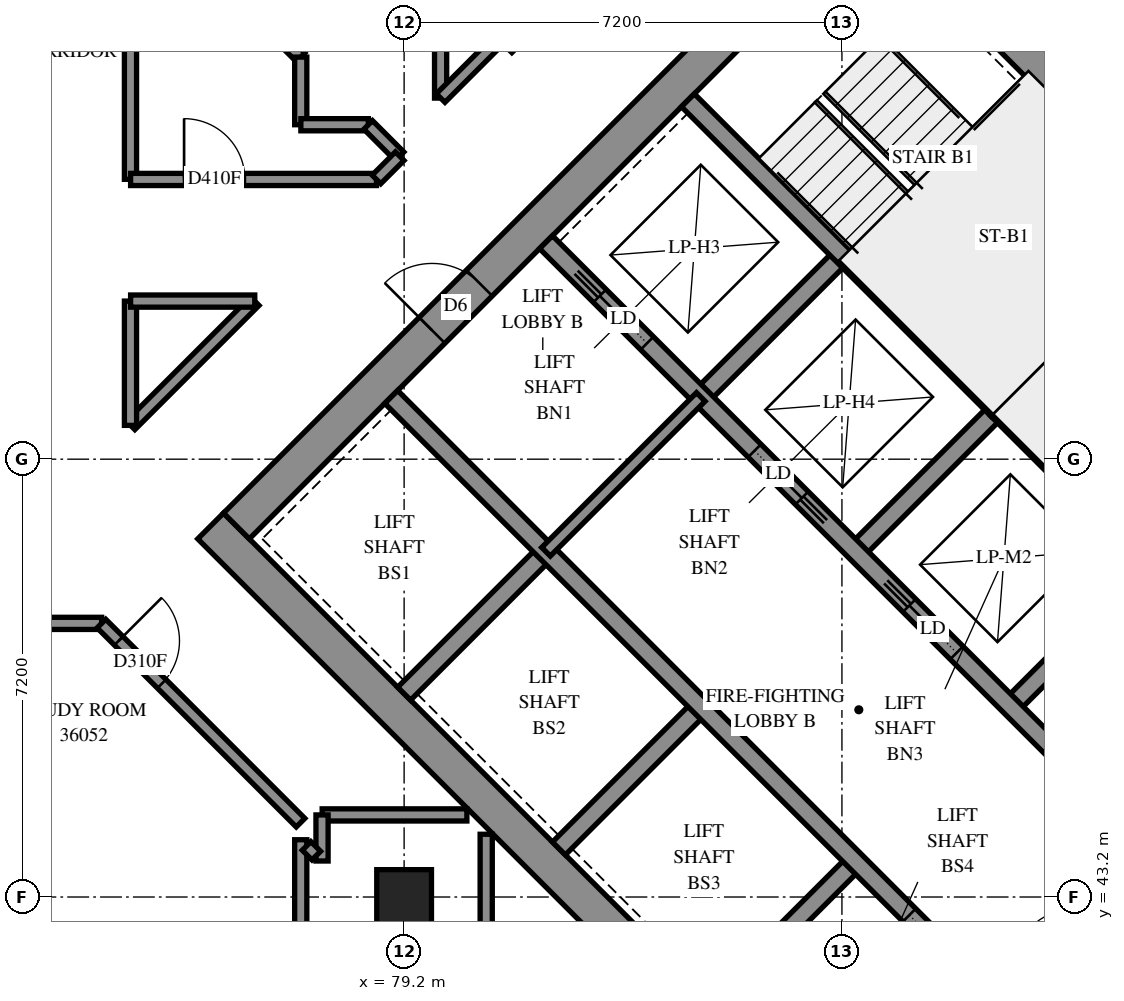
"""IFC4 building model, lengths in metres.
Left out: names, types, materials, properties, quantities, classifications, styles, units other than length and angle.
Written with IfcOpenShell. Run it as: python <this file> out.ifc"""

import sys

from ifc_helpers import new_model, si_unit, direction, frame, frame_2d, origin, origin_2d, place, context, subcontext, project, spatial, rectangle, extrude, element, fill, save


model = new_model("IFC4")
c1 = context("Model", 3, precision=1e-05, world=origin(), true_north=direction((0.0, 1.0)))
c2 = subcontext(c1, "Body", "Model", "MODEL_VIEW")
j1 = project(units=[si_unit("LENGTHUNIT", "METRE"), si_unit("PLANEANGLEUNIT", "RADIAN")], contexts=[c1])
p1 = place(None, origin())
s1 = spatial("IfcSite", under=j1, at=p1, CompositionType="ELEMENT")
p2 = place(p1, origin())
s2 = spatial("IfcBuilding", under=s1, at=p2, CompositionType="ELEMENT")
p3 = place(p2, frame((0.0, 0.0, 135.4)))
s3 = spatial("IfcBuildingStorey", under=s2, at=p3, CompositionType="ELEMENT", Elevation=135.4)
p4 = place(p3, frame((79.2, 43.2, 0.0), z_axis=(0.0, 0.0, 1.0), x_axis=(1.0, 0.0, 0.0)))
e1 = element("IfcColumn", 1, at=p4, inside=s3, PredefinedType="COLUMN", context=c2, shape_type="SweptSolid", body=[
    extrude(rectangle(XDim=0.9, YDim=0.9, at=origin_2d()), origin(), (0.0, 0.0, 1.0), 3.1),
])
p5 = place(p3, frame((76.018, 49.302, -0.3), z_axis=(0.0, 0.0, 1.0), x_axis=(0.7071067812, -0.7071067812, 0.0)))
e2 = element("IfcWall", 2, at=p5, inside=s3, PredefinedType="SHEAR", context=c2, shape_type="SweptSolid", body=[
    extrude(rectangle(XDim=15.6, YDim=0.6, at=frame_2d((7.8, 0.0))), origin(), (0.0, 0.0, 1.0), 2.7),
])
p6 = place(p3, frame((86.625, 59.908, -0.3), z_axis=(0.0, 0.0, 1.0), x_axis=(0.7071067812, -0.7071067812, 0.0)))
e3 = element("IfcWall", 3, at=p6, inside=s3, PredefinedType="SHEAR", context=c2, shape_type="SweptSolid", body=[
    extrude(rectangle(XDim=15.6, YDim=0.6, at=frame_2d((7.8, 0.0))), origin(), (0.0, 0.0, 1.0), 2.7),
])
p7 = place(p6, frame((10.6, 0.0, 0.3)))
e4 = element("IfcOpeningElement", 4, at=p7, cuts=e3, PredefinedType="OPENING", context=c2, shape_type="SweptSolid", body=[
    extrude(rectangle(XDim=0.8, YDim=2.1, at=frame_2d((0.4, 1.05))), frame((0.0, 0.31, 0.0), z_axis=(0.0, -1.0, 0.0), x_axis=(1.0, 0.0, 0.0)), (0.0, 0.0, 1.0), 0.62),
])
p8 = place(p3, frame((76.442, 49.302, -0.3), z_axis=(0.0, 0.0, 1.0), x_axis=(0.7071067812, 0.7071067812, 0.0)))
e5 = element("IfcWall", 5, at=p8, inside=s3, PredefinedType="SHEAR", context=c2, shape_type="SweptSolid", body=[
    extrude(rectangle(XDim=14.4, YDim=0.6, at=frame_2d((7.2, 0.0))), origin(), (0.0, 0.0, 1.0), 2.7),
])
p9 = place(p8, frame((4.55, 0.0, 0.3)))
e6 = element("IfcOpeningElement", 6, at=p9, cuts=e5, PredefinedType="OPENING", context=c2, shape_type="SweptSolid", body=[
    extrude(rectangle(XDim=1.1, YDim=2.1, at=frame_2d((0.55, 1.05))), frame((0.0, 0.31, 0.0), z_axis=(0.0, -1.0, 0.0), x_axis=(1.0, 0.0, 0.0)), (0.0, 0.0, 1.0), 0.62),
])
p10 = place(p8, frame((11.35, 0.0, 0.3)))
e7 = element("IfcOpeningElement", 7, at=p10, cuts=e5, PredefinedType="OPENING", context=c2, shape_type="SweptSolid", body=[
    extrude(rectangle(XDim=1.1, YDim=2.1, at=frame_2d((0.55, 1.05))), frame((0.0, 0.31, 0.0), z_axis=(0.0, -1.0, 0.0), x_axis=(1.0, 0.0, 0.0)), (0.0, 0.0, 1.0), 0.62),
])
p11 = place(p3, frame((87.049, 38.695, -0.3), z_axis=(0.0, 0.0, 1.0), x_axis=(0.7071067812, 0.7071067812, 0.0)))
e8 = element("IfcWall", 8, at=p11, inside=s3, PredefinedType="SHEAR", context=c2, shape_type="SweptSolid", body=[
    extrude(rectangle(XDim=14.4, YDim=0.6, at=frame_2d((7.2, 0.0))), origin(), (0.0, 0.0, 1.0), 2.7),
])
p12 = place(p11, frame((4.55, 0.0, 0.3)))
e9 = element("IfcOpeningElement", 9, at=p12, cuts=e8, PredefinedType="OPENING", context=c2, shape_type="SweptSolid", body=[
    extrude(rectangle(XDim=1.1, YDim=2.1, at=frame_2d((0.55, 1.05))), frame((0.0, 0.31, 0.0), z_axis=(0.0, -1.0, 0.0), x_axis=(1.0, 0.0, 0.0)), (0.0, 0.0, 1.0), 0.62),
])
p13 = place(p11, frame((11.35, 0.0, 0.3)))
e10 = element("IfcOpeningElement", 10, at=p13, cuts=e8, PredefinedType="OPENING", context=c2, shape_type="SweptSolid", body=[
    extrude(rectangle(XDim=1.1, YDim=2.1, at=frame_2d((0.55, 1.05))), frame((0.0, 0.31, 0.0), z_axis=(0.0, -1.0, 0.0), x_axis=(1.0, 0.0, 0.0)), (0.0, 0.0, 1.0), 0.62),
])
for number, where, z_axis, x_axis in (
    (11, (79.2, 46.544, 0.0), (0.0, 0.0, 1.0), (0.707, 0.707, 0.0)),
    (12, (84.079, 51.423, 0.0), (0.0, 0.0, 1.0), (0.707, 0.707, 0.0)),
):
    element("IfcWall", number, at=place(p3, frame(where, z_axis=z_axis, x_axis=x_axis)), inside=s3, PredefinedType="SOLIDWALL", context=c2, shape_type="SweptSolid", body=[
        extrude(rectangle(XDim=3.3, YDim=0.3, at=frame_2d((1.65, 0.0))), origin(), (0.0, 0.0, 1.0), 3.1),
    ])
p14 = place(p3, frame((81.746, 43.999, 0.0), z_axis=(0.0, 0.0, 1.0), x_axis=(0.7071067812, 0.7071067812, 0.0)))
e13 = element("IfcWall", 13, at=p14, inside=s3, PredefinedType="SOLIDWALL", context=c2, shape_type="SweptSolid", body=[
    extrude(rectangle(XDim=3.3, YDim=0.3, at=frame_2d((1.65, 0.0))), origin(), (0.0, 0.0, 1.0), 3.1),
])
p15 = place(p3, frame((86.625, 48.878, 0.0), z_axis=(0.0, 0.0, 1.0), x_axis=(0.7071067812, 0.7071067812, 0.0)))
e14 = element("IfcWall", 14, at=p15, inside=s3, PredefinedType="SOLIDWALL", context=c2, shape_type="SweptSolid", body=[
    extrude(rectangle(XDim=3.3, YDim=0.3, at=frame_2d((1.65, 0.0))), origin(), (0.0, 0.0, 1.0), 3.1),
])
p16 = place(p3, frame((84.291, 41.453, 0.0), z_axis=(0.0, 0.0, 1.0), x_axis=(0.7071067812, 0.7071067812, 0.0)))
e15 = element("IfcWall", 15, at=p16, inside=s3, PredefinedType="SOLIDWALL", context=c2, shape_type="SweptSolid", body=[
    extrude(rectangle(XDim=3.3, YDim=0.3, at=frame_2d((1.65, 0.0))), origin(), (0.0, 0.0, 1.0), 3.1),
])
p17 = place(p3, frame((89.17, 46.332, 0.0), z_axis=(0.0, 0.0, 1.0), x_axis=(0.7071067812, 0.7071067812, 0.0)))
e16 = element("IfcWall", 16, at=p17, inside=s3, PredefinedType="SOLIDWALL", context=c2, shape_type="SweptSolid", body=[
    extrude(rectangle(XDim=3.3, YDim=0.3, at=frame_2d((1.65, 0.0))), origin(), (0.0, 0.0, 1.0), 3.1),
])
p18 = place(p3, frame((78.988, 51.423, 0.0), z_axis=(0.0, 0.0, 1.0), x_axis=(0.7071067812, -0.7071067812, 0.0)))
e17 = element("IfcWall", 17, at=p18, inside=s3, PredefinedType="SOLIDWALL", context=c2, shape_type="SweptSolid", body=[
    extrude(rectangle(XDim=14.4, YDim=0.3, at=frame_2d((7.2, 0.0))), origin(), (0.0, 0.0, 1.0), 3.1),
])
p19 = place(p18, frame((12.05, 0.0, 0.0)))
e18 = element("IfcOpeningElement", 18, at=p19, cuts=e17, PredefinedType="OPENING", context=c2, shape_type="SweptSolid", body=[
    extrude(rectangle(XDim=1.1, YDim=2.1, at=frame_2d((0.55, 1.05))), frame((0.0, 0.16, 0.0), z_axis=(0.0, -1.0, 0.0), x_axis=(1.0, 0.0, 0.0)), (0.0, 0.0, 1.0), 0.32),
])
p20 = place(p3, frame((81.534, 53.969, 0.0), z_axis=(0.0, 0.0, 1.0), x_axis=(0.707103309, -0.7071102534, 0.0)))
e19 = element("IfcWall", 19, at=p20, inside=s3, PredefinedType="SOLIDWALL", context=c2, shape_type="SweptSolid", body=[
    extrude(rectangle(XDim=14.4, YDim=0.3, at=frame_2d((7.2, 0.0))), origin(), (0.0, 0.0, 1.0), 3.1),
])
p21 = place(p20, frame((1.25, 0.0, 0.0)))
e20 = element("IfcOpeningElement", 20, at=p21, cuts=e19, PredefinedType="OPENING", context=c2, shape_type="SweptSolid", body=[
    extrude(rectangle(XDim=1.1, YDim=2.1, at=frame_2d((0.55, 1.05))), frame((0.0, 0.16, 0.0), z_axis=(0.0, -1.0, 0.0), x_axis=(1.0, 0.0, 0.0)), (0.0, 0.0, 1.0), 0.32),
])
p22 = place(p20, frame((4.85, 0.0, 0.0)))
e21 = element("IfcOpeningElement", 21, at=p22, cuts=e19, PredefinedType="OPENING", context=c2, shape_type="SweptSolid", body=[
    extrude(rectangle(XDim=1.1, YDim=2.1, at=frame_2d((0.55, 1.05))), frame((0.0, 0.16, 0.0), z_axis=(0.0, -1.0, 0.0), x_axis=(1.0, 0.0, 0.0)), (0.0, 0.0, 1.0), 0.32),
])
p23 = place(p20, frame((8.45, 0.0, 0.0)))
e22 = element("IfcOpeningElement", 22, at=p23, cuts=e19, PredefinedType="OPENING", context=c2, shape_type="SweptSolid", body=[
    extrude(rectangle(XDim=1.1, YDim=2.1, at=frame_2d((0.55, 1.05))), frame((0.0, 0.16, 0.0), z_axis=(0.0, -1.0, 0.0), x_axis=(1.0, 0.0, 0.0)), (0.0, 0.0, 1.0), 0.32),
])
p24 = place(p20, frame((12.05, 0.0, 0.0)))
e23 = element("IfcOpeningElement", 23, at=p24, cuts=e19, PredefinedType="OPENING", context=c2, shape_type="SweptSolid", body=[
    extrude(rectangle(XDim=1.1, YDim=2.1, at=frame_2d((0.55, 1.05))), frame((0.0, 0.16, 0.0), z_axis=(0.0, -1.0, 0.0), x_axis=(1.0, 0.0, 0.0)), (0.0, 0.0, 1.0), 0.32),
])
for number, where, z_axis, x_axis in (
    (24, (83.867, 56.302, 0.0), (0.0, 0.0, 1.0), (0.707, -0.707, 0.0)),
    (25, (88.958, 51.211, 0.0), (0.0, 0.0, 1.0), (0.707, -0.707, 0.0)),
):
    element("IfcWall", number, at=place(p3, frame(where, z_axis=z_axis, x_axis=x_axis)), inside=s3, PredefinedType="SOLIDWALL", context=c2, shape_type="SweptSolid", body=[
        extrude(rectangle(XDim=7.2, YDim=0.3, at=frame_2d((3.6, 0.0))), origin(), (0.0, 0.0, 1.0), 3.1),
    ])
p25 = place(p3, frame((88.958, 51.211, 0.0), z_axis=(0.0, 0.0, 1.0), x_axis=(0.7071067812, 0.7071067812, 0.0)))
e26 = element("IfcWall", 26, at=p25, inside=s3, PredefinedType="SOLIDWALL", context=c2, shape_type="SweptSolid", body=[
    extrude(rectangle(XDim=4.2, YDim=0.3, at=frame_2d((2.1, 0.0))), origin(), (0.0, 0.0, 1.0), 3.1),
])
p26 = place(p3, frame((81.534, 48.878, 0.0), z_axis=(0.0, 0.0, 1.0), x_axis=(0.707092892, 0.7071206701, 0.0)))
e27 = element("IfcWall", 27, at=p26, inside=s3, PredefinedType="PARTITIONING", context=c2, shape_type="SweptSolid", body=[
    extrude(rectangle(XDim=3.6, YDim=0.2, at=frame_2d((1.8, 0.0))), origin(), (0.0, 0.0, 1.0), 3.1),
])
p27 = place(p3, frame((54.9, 47.7, 0.0), z_axis=(0.0, 0.0, 1.0), x_axis=(1.0, 0.0, 0.0)))
e28 = element("IfcWall", 28, at=p27, inside=s3, PredefinedType="PARTITIONING", context=c2, shape_type="SweptSolid", body=[
    extrude(rectangle(XDim=19.326, YDim=0.2, at=frame_2d((9.663, 0.0))), origin(), (0.0, 0.0, 1.0), 3.1),
])
p28 = place(p27, frame((5.0, 0.0, 0.0)))
e29 = element("IfcOpeningElement", 29, at=p28, cuts=e28, PredefinedType="OPENING", context=c2, shape_type="SweptSolid", body=[
    extrude(rectangle(XDim=0.9, YDim=2.1, at=frame_2d((0.45, 1.05))), frame((0.0, 0.11, 0.0), z_axis=(0.0, -1.0, 0.0), x_axis=(1.0, 0.0, 0.0)), (0.0, 0.0, 1.0), 0.22),
])
p29 = place(p27, frame((12.2, 0.0, 0.0)))
e30 = element("IfcOpeningElement", 30, at=p29, cuts=e28, PredefinedType="OPENING", context=c2, shape_type="SweptSolid", body=[
    extrude(rectangle(XDim=0.9, YDim=2.1, at=frame_2d((0.45, 1.05))), frame((0.0, 0.11, 0.0), z_axis=(0.0, -1.0, 0.0), x_axis=(1.0, 0.0, 0.0)), (0.0, 0.0, 1.0), 0.22),
])
p30 = place(p27, frame((6.7, 0.0, 0.0)))
e31 = element("IfcOpeningElement", 31, at=p30, cuts=e28, PredefinedType="OPENING", context=c2, shape_type="SweptSolid", body=[
    extrude(rectangle(XDim=0.9, YDim=2.1, at=frame_2d((0.45, 1.05))), frame((0.0, 0.11, 0.0), z_axis=(0.0, -1.0, 0.0), x_axis=(1.0, 0.0, 0.0)), (0.0, 0.0, 1.0), 0.22),
])
p31 = place(p27, frame((13.9, 0.0, 0.0)))
e32 = element("IfcOpeningElement", 32, at=p31, cuts=e28, PredefinedType="OPENING", context=c2, shape_type="SweptSolid", body=[
    extrude(rectangle(XDim=0.9, YDim=2.1, at=frame_2d((0.45, 1.05))), frame((0.0, 0.11, 0.0), z_axis=(0.0, -1.0, 0.0), x_axis=(1.0, 0.0, 0.0)), (0.0, 0.0, 1.0), 0.22),
])
p32 = place(p3, frame((88.326, 61.609, 0.0), z_axis=(0.0, 0.0, 1.0), x_axis=(0.7071067812, -0.7071067812, 0.0)))
e33 = element("IfcWall", 33, at=p32, inside=s3, PredefinedType="PARTITIONING", context=c2, shape_type="SweptSolid", body=[
    extrude(rectangle(XDim=10.14, YDim=0.2, at=frame_2d((5.07, 0.0))), origin(), (0.0, 0.0, 1.0), 3.1),
])
p33 = place(p32, frame((8.422, 0.0, 0.0)))
e34 = element("IfcOpeningElement", 34, at=p33, cuts=e33, PredefinedType="OPENING", context=c2, shape_type="SweptSolid", body=[
    extrude(rectangle(XDim=0.9, YDim=2.1, at=frame_2d((0.45, 1.05))), frame((0.0, 0.11, 0.0), z_axis=(0.0, -1.0, 0.0), x_axis=(1.0, 0.0, 0.0)), (0.0, 0.0, 1.0), 0.22),
])
p34 = place(p3, frame((80.901, 57.157, 0.0), z_axis=(0.0, 0.0, 1.0), x_axis=(0.7071067812, 0.7071067812, 0.0)))
e35 = element("IfcWall", 35, at=p34, inside=s3, PredefinedType="PARTITIONING", context=c2, shape_type="SweptSolid", body=[
    extrude(rectangle(XDim=8.392, YDim=0.2, at=frame_2d((4.196, 0.0))), origin(), (0.0, 0.0, 1.0), 3.1),
])
p35 = place(p3, frame((74.7, 55.002, 0.0), z_axis=(0.0, 0.0, 1.0), x_axis=(0.0, 1.0, 0.0)))
e36 = element("IfcWall", 36, at=p35, inside=s3, PredefinedType="PARTITIONING", context=c2, shape_type="SweptSolid", body=[
    extrude(rectangle(XDim=4.808, YDim=0.2, at=frame_2d((2.404, 0.0))), origin(), (0.0, 0.0, 1.0), 3.1),
])
p36 = place(p3, frame((74.223, 47.697, 0.0), z_axis=(0.0, 0.0, 1.0), x_axis=(0.7071067812, -0.7071067812, 0.0)))
e37 = element("IfcWall", 37, at=p36, inside=s3, PredefinedType="PARTITIONING", context=c2, shape_type="SweptSolid", body=[
    extrude(rectangle(XDim=4.63, YDim=0.2, at=frame_2d((2.315, 0.0))), origin(), (0.0, 0.0, 1.0), 3.1),
])
p37 = place(p36, frame((0.401, 0.0, 0.0)))
e38 = element("IfcOpeningElement", 38, at=p37, cuts=e37, PredefinedType="OPENING", context=c2, shape_type="SweptSolid", body=[
    extrude(rectangle(XDim=1.0, YDim=2.1, at=frame_2d((0.5, 1.05))), frame((0.0, 0.11, 0.0), z_axis=(0.0, -1.0, 0.0), x_axis=(1.0, 0.0, 0.0)), (0.0, 0.0, 1.0), 0.22),
])
p38 = place(p3, frame((74.702, 55.0, 0.0), z_axis=(0.0, 0.0, 1.0), x_axis=(1.0, 0.0, 0.0)))
e39 = element("IfcWall", 39, at=p38, inside=s3, PredefinedType="PARTITIONING", context=c2, shape_type="SweptSolid", body=[
    extrude(rectangle(XDim=4.044, YDim=0.2, at=frame_2d((2.022, 0.0))), origin(), (0.0, 0.0, 1.0), 3.1),
])
p39 = place(p38, frame((0.879, 0.0, 0.0)))
e40 = element("IfcOpeningElement", 40, at=p39, cuts=e39, PredefinedType="OPENING", context=c2, shape_type="SweptSolid", body=[
    extrude(rectangle(XDim=1.0, YDim=2.1, at=frame_2d((0.5, 1.05))), frame((0.0, 0.11, 0.0), z_axis=(0.0, -1.0, 0.0), x_axis=(1.0, 0.0, 0.0)), (0.0, 0.0, 1.0), 0.22),
])
p40 = place(p3, frame((74.699, 59.807, 0.0), z_axis=(0.0, 0.0, 1.0), x_axis=(0.7071067812, -0.7071067812, 0.0)))
e41 = element("IfcWall", 41, at=p40, inside=s3, PredefinedType="PARTITIONING", context=c2, shape_type="SweptSolid", body=[
    extrude(rectangle(XDim=3.957, YDim=0.2, at=frame_2d((1.978, 0.0))), origin(), (0.0, 0.0, 1.0), 3.1),
])
p41 = place(p3, frame((79.8, 56.338, 0.0), z_axis=(0.0, 0.0, 1.0), x_axis=(0.0, 1.0, 0.0)))
e42 = element("IfcWall", 42, at=p41, inside=s3, PredefinedType="PARTITIONING", context=c2, shape_type="SweptSolid", body=[
    extrude(rectangle(XDim=2.962, YDim=0.2, at=frame_2d((1.481, 0.0))), origin(), (0.0, 0.0, 1.0), 3.1),
])
p42 = place(p3, frame((74.701, 50.957, 0.0), z_axis=(0.0, 0.0, 1.0), x_axis=(0.7071067812, 0.7071067812, 0.0)))
e43 = element("IfcWall", 43, at=p42, inside=s3, PredefinedType="PARTITIONING", context=c2, shape_type="SweptSolid", body=[
    extrude(rectangle(XDim=2.888, YDim=0.2, at=frame_2d((1.444, 0.0))), origin(), (0.0, 0.0, 1.0), 3.1),
])
p43 = place(p3, frame((77.5, 41.108, 0.0), z_axis=(0.0, 0.0, 1.0), x_axis=(0.0, 1.0, 0.0)))
e44 = element("IfcWall", 44, at=p43, inside=s3, PredefinedType="PARTITIONING", context=c2, shape_type="SweptSolid", body=[
    extrude(rectangle(XDim=3.034, YDim=0.2, at=frame_2d((1.517, 0.0))), origin(), (0.0, 0.0, 1.0), 3.1),
])
for number, where, z_axis, x_axis in (
    (45, (80.55, 41.852, 0.0), (0.0, 0.0, 1.0), (0.0, 1.0, 0.0)),
    (46, (77.852, 44.55, 0.0), (0.0, 0.0, 1.0), (1.0, 0.0, 0.0)),
):
    element("IfcWall", number, at=place(p3, frame(where, z_axis=z_axis, x_axis=x_axis)), inside=s3, PredefinedType="PARTITIONING", context=c2, shape_type="SweptSolid", body=[
        extrude(rectangle(XDim=2.38, YDim=0.2, at=frame_2d((1.19, 0.0))), origin(), (0.0, 0.0, 1.0), 3.1),
    ])
p44 = place(p3, frame((74.7, 50.956, 0.0), z_axis=(0.0, 0.0, 1.0), x_axis=(0.0, 1.0, 0.0)))
e47 = element("IfcWall", 47, at=p44, inside=s3, PredefinedType="PARTITIONING", context=c2, shape_type="SweptSolid", body=[
    extrude(rectangle(XDim=2.044, YDim=0.2, at=frame_2d((1.022, 0.0))), origin(), (0.0, 0.0, 1.0), 3.1),
])
p45 = place(p3, frame((74.702, 53.0, 0.0), z_axis=(0.0, 0.0, 1.0), x_axis=(1.0, 0.0, 0.0)))
e48 = element("IfcWall", 48, at=p45, inside=s3, PredefinedType="PARTITIONING", context=c2, shape_type="SweptSolid", body=[
    extrude(rectangle(XDim=2.042, YDim=0.2, at=frame_2d((1.021, 0.0))), origin(), (0.0, 0.0, 1.0), 3.1),
])
p46 = place(p3, frame((79.801, 56.339, 0.0), z_axis=(0.0, 0.0, 1.0), x_axis=(0.7071067812, 0.7071067812, 0.0)))
e49 = element("IfcWall", 49, at=p46, inside=s3, PredefinedType="PARTITIONING", context=c2, shape_type="SweptSolid", body=[
    extrude(rectangle(XDim=1.553, YDim=0.2, at=frame_2d((0.776, 0.0))), origin(), (0.0, 0.0, 1.0), 3.1),
])
p47 = place(p3, frame((77.5, 55.9, 0.0), z_axis=(0.0, 0.0, 1.0), x_axis=(0.0, 1.0, 0.0)))
e50 = element("IfcWall", 50, at=p47, inside=s3, PredefinedType="PARTITIONING", context=c2, shape_type="SweptSolid", body=[
    extrude(rectangle(XDim=1.112, YDim=0.2, at=frame_2d((0.556, 0.0))), origin(), (0.0, 0.0, 1.0), 3.1),
])
p48 = place(p3, frame((77.502, 55.9, 0.0), z_axis=(0.0, 0.0, 1.0), x_axis=(1.0, 0.0, 0.0)))
e51 = element("IfcWall", 51, at=p48, inside=s3, PredefinedType="PARTITIONING", context=c2, shape_type="SweptSolid", body=[
    extrude(rectangle(XDim=1.11, YDim=0.2, at=frame_2d((0.555, 0.0))), origin(), (0.0, 0.0, 1.0), 3.1),
])
p49 = place(p3, frame((77.85, 43.792, 0.0), z_axis=(0.0, 0.0, 1.0), x_axis=(0.0, 1.0, 0.0)))
e52 = element("IfcWall", 52, at=p49, inside=s3, PredefinedType="PARTITIONING", context=c2, shape_type="SweptSolid", body=[
    extrude(rectangle(XDim=0.758, YDim=0.2, at=frame_2d((0.379, 0.0))), origin(), (0.0, 0.0, 1.0), 3.1),
])
p50 = place(p3, frame((78.609, 55.897, 0.0), z_axis=(0.0, 0.0, 1.0), x_axis=(0.7071067812, -0.7071067812, 0.0)))
e53 = element("IfcWall", 53, at=p50, inside=s3, PredefinedType="PARTITIONING", context=c2, shape_type="SweptSolid", body=[
    extrude(rectangle(XDim=0.73, YDim=0.2, at=frame_2d((0.365, 0.0))), origin(), (0.0, 0.0, 1.0), 3.1),
])
p51 = place(p3, frame((78.745, 55.001, 0.0), z_axis=(0.0, 0.0, 1.0), x_axis=(0.7071067812, 0.7071067812, 0.0)))
e54 = element("IfcWall", 54, at=p51, inside=s3, PredefinedType="PARTITIONING", context=c2, shape_type="SweptSolid", body=[
    extrude(rectangle(XDim=0.54, YDim=0.2, at=frame_2d((0.27, 0.0))), origin(), (0.0, 0.0, 1.0), 3.1),
])
p52 = place(p3, frame((77.596, 44.04, 0.0), z_axis=(0.0, 0.0, 1.0), x_axis=(0.7071067812, -0.7071067812, 0.0)))
e55 = element("IfcWall", 55, at=p52, inside=s3, PredefinedType="PARTITIONING", context=c2, shape_type="SweptSolid", body=[
    extrude(rectangle(XDim=0.225, YDim=0.2, at=frame_2d((0.113, 0.0))), origin(), (0.0, 0.0, 1.0), 3.1),
])
p53 = place(p9, origin())
e56 = element("IfcDoor", 56, at=p53, inside=s3, OperationType="DOUBLE_DOOR_SINGLE_SWING", PredefinedType="DOOR", context=c2, shape_type="SweptSolid", body=[
    extrude(rectangle(XDim=1.1, YDim=2.1, at=frame_2d((0.55, 1.05))), frame((0.0, 0.025, 0.0), z_axis=(0.0, -1.0, 0.0), x_axis=(1.0, 0.0, 0.0)), (0.0, 0.0, 1.0), 0.05),
])
fill(e6, e56)
p54 = place(p19, origin())
e57 = element("IfcDoor", 57, at=p54, inside=s3, OperationType="SLIDING_TO_RIGHT", PredefinedType="DOOR", context=c2, shape_type="SweptSolid", body=[
    extrude(rectangle(XDim=1.1, YDim=2.1, at=frame_2d((0.55, 1.05))), frame((0.0, 0.025, 0.0), z_axis=(0.0, -1.0, 0.0), x_axis=(1.0, 0.0, 0.0)), (0.0, 0.0, 1.0), 0.05),
])
fill(e18, e57)
p55 = place(p21, origin())
e58 = element("IfcDoor", 58, at=p55, inside=s3, OperationType="SLIDING_TO_LEFT", PredefinedType="DOOR", context=c2, shape_type="SweptSolid", body=[
    extrude(rectangle(XDim=1.1, YDim=2.1, at=frame_2d((0.55, 1.05))), frame((0.0, 0.025, 0.0), z_axis=(0.0, -1.0, 0.0), x_axis=(1.0, 0.0, 0.0)), (0.0, 0.0, 1.0), 0.05),
])
fill(e20, e58)
p56 = place(p22, origin())
e59 = element("IfcDoor", 59, at=p56, inside=s3, OperationType="SLIDING_TO_RIGHT", PredefinedType="DOOR", context=c2, shape_type="SweptSolid", body=[
    extrude(rectangle(XDim=1.1, YDim=2.1, at=frame_2d((0.55, 1.05))), frame((0.0, 0.025, 0.0), z_axis=(0.0, -1.0, 0.0), x_axis=(1.0, 0.0, 0.0)), (0.0, 0.0, 1.0), 0.05),
])
fill(e21, e59)
p57 = place(p23, origin())
e60 = element("IfcDoor", 60, at=p57, inside=s3, OperationType="SLIDING_TO_LEFT", PredefinedType="DOOR", context=c2, shape_type="SweptSolid", body=[
    extrude(rectangle(XDim=1.1, YDim=2.1, at=frame_2d((0.55, 1.05))), frame((0.0, 0.025, 0.0), z_axis=(0.0, -1.0, 0.0), x_axis=(1.0, 0.0, 0.0)), (0.0, 0.0, 1.0), 0.05),
])
fill(e22, e60)
p58 = place(p39, origin())
e61 = element("IfcDoor", 61, at=p58, inside=s3, OperationType="SINGLE_SWING_LEFT", PredefinedType="DOOR", context=c2, shape_type="SweptSolid", body=[
    extrude(rectangle(XDim=1.0, YDim=2.1, at=frame_2d((0.5, 1.05))), frame((0.0, 0.025, 0.0), z_axis=(0.0, -1.0, 0.0), x_axis=(1.0, 0.0, 0.0)), (0.0, 0.0, 1.0), 0.05),
])
fill(e40, e61)
p59 = place(p37, origin())
e62 = element("IfcDoor", 62, at=p59, inside=s3, OperationType="SINGLE_SWING_LEFT", PredefinedType="DOOR", context=c2, shape_type="SweptSolid", body=[
    extrude(rectangle(XDim=1.0, YDim=2.1, at=frame_2d((0.5, 1.05))), frame((0.0, 0.025, 0.0), z_axis=(0.0, -1.0, 0.0), x_axis=(1.0, 0.0, 0.0)), (0.0, 0.0, 1.0), 0.05),
])
fill(e38, e62)
save(model, sys.argv[1])
